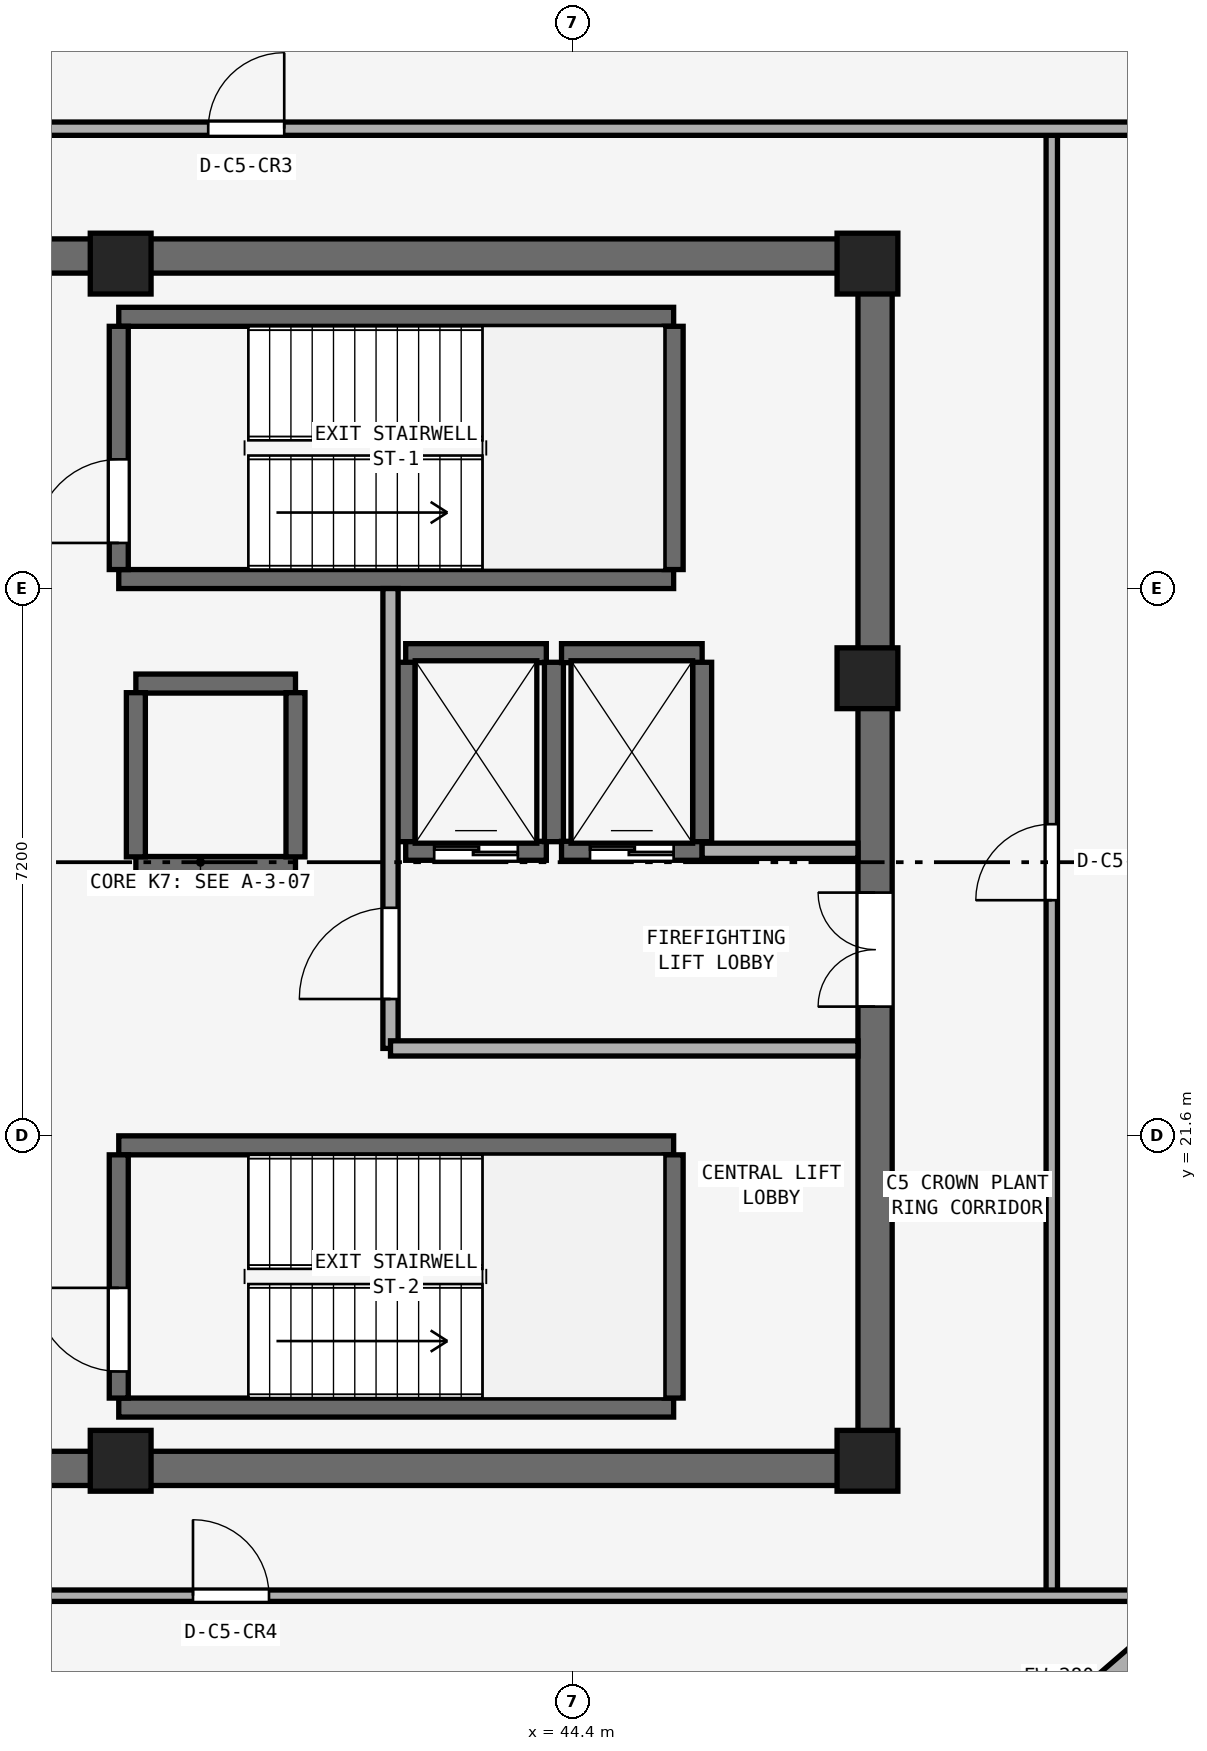
"""IFC4 building model, lengths in metres.
Left out: names, types, materials, properties, quantities, classifications, styles, units other than length and angle.
Written with IfcOpenShell. Run it as: python <this file> out.ifc"""

import sys

from ifc_helpers import new_model, si_unit, direction, frame, frame_2d, origin, origin_2d, place, context, subcontext, project, spatial, rectangle, extrude, element, fill, save


model = new_model("IFC4")
c1 = context("Model", 3, precision=1e-05, world=origin(), true_north=direction((0.0, 1.0)))
c2 = subcontext(c1, "Body", "Model", "MODEL_VIEW")
j1 = project(units=[si_unit("LENGTHUNIT", "METRE"), si_unit("PLANEANGLEUNIT", "RADIAN")], contexts=[c1])
p1 = place(None, origin())
s1 = spatial("IfcSite", under=j1, at=p1, CompositionType="ELEMENT")
p2 = place(p1, origin())
s2 = spatial("IfcBuilding", under=s1, at=p2, CompositionType="ELEMENT")
p3 = place(p2, frame((0.0, 0.0, 329.4)))
s3 = spatial("IfcBuildingStorey", under=s2, at=p3, CompositionType="ELEMENT", Elevation=329.4)
for number, where, z_axis, x_axis in (
    (1, (30.4, 17.225, 0.0), (0.0, 0.0, 1.0), (1.0, 0.0, 0.0)),
    (2, (30.4, 33.175, 0.0), (0.0, 0.0, 1.0), (1.0, 0.0, 0.0)),
):
    element("IfcWall", number, at=place(p3, frame(where, z_axis=z_axis, x_axis=x_axis)), inside=s3, PredefinedType="SHEAR", context=c2, shape_type="SweptSolid", body=[
        extrude(rectangle(XDim=18.2, YDim=0.45, at=frame_2d((9.1, 0.0))), origin(), (0.0, 0.0, 1.0), 3.72),
    ])
p4 = place(p3, frame((48.375, 17.45, 0.0), z_axis=(0.0, 0.0, 1.0), x_axis=(0.0, 1.0, 0.0)))
e3 = element("IfcWall", 3, at=p4, inside=s3, PredefinedType="SHEAR", context=c2, shape_type="SweptSolid", body=[
    extrude(rectangle(XDim=15.5, YDim=0.45, at=frame_2d((7.75, 0.0))), origin(), (0.0, 0.0, 1.0), 3.72),
])
p5 = place(p4, frame((5.85, 0.0, 0.0)))
e4 = element("IfcOpeningElement", 4, at=p5, cuts=e3, PredefinedType="OPENING", context=c2, shape_type="SweptSolid", body=[
    extrude(rectangle(XDim=1.5, YDim=2.15, at=frame_2d((0.75, 1.075))), frame((0.0, 0.235, 0.0), z_axis=(0.0, -1.0, 0.0), x_axis=(1.0, 0.0, 0.0)), (0.0, 0.0, 1.0), 0.47),
])
for number, where, z_axis, x_axis in (
    (5, (38.45, 17.325, 0.0), (0.0, 0.0, 1.0), (1.0, 0.0, 0.0)),
    (6, (48.275, 17.325, 0.0), (0.0, 0.0, 1.0), (1.0, 0.0, 0.0)),
    (7, (48.275, 27.62, 0.0), (0.0, 0.0, 1.0), (1.0, 0.0, 0.0)),
    (8, (48.275, 33.075, 0.0), (0.0, 0.0, 1.0), (1.0, 0.0, 0.0)),
    (9, (38.45, 33.075, 0.0), (0.0, 0.0, 1.0), (1.0, 0.0, 0.0)),
):
    element("IfcColumn", number, at=place(p3, frame(where, z_axis=z_axis, x_axis=x_axis)), inside=s3, PredefinedType="PILASTER", context=c2, shape_type="SweptSolid", body=[
        extrude(rectangle(XDim=0.8, YDim=0.8, at=origin_2d()), origin(), (0.0, 0.0, 1.0), 4.0),
    ])
for number, where, z_axis, x_axis in (
    (10, (38.425, 28.925, 0.0), (0.0, 0.0, 1.0), (1.0, 0.0, 0.0)),
    (11, (38.425, 32.375, 0.0), (0.0, 0.0, 1.0), (1.0, 0.0, 0.0)),
):
    element("IfcWall", number, at=place(p3, frame(where, z_axis=z_axis, x_axis=x_axis)), inside=s3, PredefinedType="SHEAR", context=c2, shape_type="SweptSolid", body=[
        extrude(rectangle(XDim=7.3, YDim=0.25, at=frame_2d((3.65, 0.0))), origin(), (0.0, 0.0, 1.0), 3.72),
    ])
p6 = place(p3, frame((38.425, 29.05, 0.0), z_axis=(0.0, 0.0, 1.0), x_axis=(0.0, 1.0, 0.0)))
e12 = element("IfcWall", 12, at=p6, inside=s3, PredefinedType="SHEAR", context=c2, shape_type="SweptSolid", body=[
    extrude(rectangle(XDim=3.2, YDim=0.25, at=frame_2d((1.6, 0.0))), origin(), (0.0, 0.0, 1.0), 3.72),
])
p7 = place(p6, frame((0.35, 0.0, 0.0)))
e13 = element("IfcOpeningElement", 13, at=p7, cuts=e12, PredefinedType="OPENING", context=c2, shape_type="SweptSolid", body=[
    extrude(rectangle(XDim=1.1, YDim=2.15, at=frame_2d((0.55, 1.075))), frame((0.0, 0.135, 0.0), z_axis=(0.0, -1.0, 0.0), x_axis=(1.0, 0.0, 0.0)), (0.0, 0.0, 1.0), 0.27),
])
p8 = place(p3, frame((45.725, 29.05, 0.0), z_axis=(0.0, 0.0, 1.0), x_axis=(0.0, 1.0, 0.0)))
e14 = element("IfcWall", 14, at=p8, inside=s3, PredefinedType="SHEAR", context=c2, shape_type="SweptSolid", body=[
    extrude(rectangle(XDim=3.2, YDim=0.25, at=frame_2d((1.6, 0.0))), origin(), (0.0, 0.0, 1.0), 3.72),
])
for number, where, z_axis, x_axis in (
    (15, (38.425, 18.025, 0.0), (0.0, 0.0, 1.0), (1.0, 0.0, 0.0)),
    (16, (38.425, 21.475, 0.0), (0.0, 0.0, 1.0), (1.0, 0.0, 0.0)),
):
    element("IfcWall", number, at=place(p3, frame(where, z_axis=z_axis, x_axis=x_axis)), inside=s3, PredefinedType="SHEAR", context=c2, shape_type="SweptSolid", body=[
        extrude(rectangle(XDim=7.3, YDim=0.25, at=frame_2d((3.65, 0.0))), origin(), (0.0, 0.0, 1.0), 3.72),
    ])
p9 = place(p3, frame((38.425, 18.15, 0.0), z_axis=(0.0, 0.0, 1.0), x_axis=(0.0, 1.0, 0.0)))
e17 = element("IfcWall", 17, at=p9, inside=s3, PredefinedType="SHEAR", context=c2, shape_type="SweptSolid", body=[
    extrude(rectangle(XDim=3.2, YDim=0.25, at=frame_2d((1.6, 0.0))), origin(), (0.0, 0.0, 1.0), 3.72),
])
p10 = place(p9, frame((0.35, 0.0, 0.0)))
e18 = element("IfcOpeningElement", 18, at=p10, cuts=e17, PredefinedType="OPENING", context=c2, shape_type="SweptSolid", body=[
    extrude(rectangle(XDim=1.1, YDim=2.15, at=frame_2d((0.55, 1.075))), frame((0.0, 0.135, 0.0), z_axis=(0.0, -1.0, 0.0), x_axis=(1.0, 0.0, 0.0)), (0.0, 0.0, 1.0), 0.27),
])
p11 = place(p3, frame((45.725, 18.15, 0.0), z_axis=(0.0, 0.0, 1.0), x_axis=(0.0, 1.0, 0.0)))
e19 = element("IfcWall", 19, at=p11, inside=s3, PredefinedType="SHEAR", context=c2, shape_type="SweptSolid", body=[
    extrude(rectangle(XDim=3.2, YDim=0.25, at=frame_2d((1.6, 0.0))), origin(), (0.0, 0.0, 1.0), 3.72),
])
p12 = place(p3, frame((42.2, 25.35, 0.0), z_axis=(0.0, 0.0, 1.0), x_axis=(1.0, 0.0, 0.0)))
e20 = element("IfcWall", 20, at=p12, inside=s3, PredefinedType="SHEAR", context=c2, shape_type="SweptSolid", body=[
    extrude(rectangle(XDim=1.85, YDim=0.25, at=frame_2d((0.925, 0.0))), origin(), (0.0, 0.0, 1.0), 3.72),
])
p13 = place(p12, frame((0.375, 0.0, 0.0)))
e21 = element("IfcOpeningElement", 21, at=p13, cuts=e20, PredefinedType="OPENING", context=c2, shape_type="SweptSolid", body=[
    extrude(rectangle(XDim=1.1, YDim=2.15, at=frame_2d((0.55, 1.075))), frame((0.0, 0.135, 0.0), z_axis=(0.0, -1.0, 0.0), x_axis=(1.0, 0.0, 0.0)), (0.0, 0.0, 1.0), 0.27),
])
p14 = place(p3, frame((42.2, 27.95, 0.0), z_axis=(0.0, 0.0, 1.0), x_axis=(1.0, 0.0, 0.0)))
e22 = element("IfcWall", 22, at=p14, inside=s3, PredefinedType="SHEAR", context=c2, shape_type="SweptSolid", body=[
    extrude(rectangle(XDim=1.85, YDim=0.25, at=frame_2d((0.925, 0.0))), origin(), (0.0, 0.0, 1.0), 3.72),
])
for number, where, z_axis, x_axis in (
    (23, (42.2, 25.47, 0.0), (0.0, 0.0, 1.0), (0.0, 1.0, 0.0)),
    (24, (44.15, 25.47, 0.0), (0.0, 0.0, 1.0), (0.0, 1.0, 0.0)),
):
    element("IfcWall", number, at=place(p3, frame(where, z_axis=z_axis, x_axis=x_axis)), inside=s3, PredefinedType="SHEAR", context=c2, shape_type="SweptSolid", body=[
        extrude(rectangle(XDim=2.36, YDim=0.25, at=frame_2d((1.18, 0.0))), origin(), (0.0, 0.0, 1.0), 3.72),
    ])
p15 = place(p3, frame((44.25, 25.35, 0.0), z_axis=(0.0, 0.0, 1.0), x_axis=(1.0, 0.0, 0.0)))
e25 = element("IfcWall", 25, at=p15, inside=s3, PredefinedType="SHEAR", context=c2, shape_type="SweptSolid", body=[
    extrude(rectangle(XDim=1.85, YDim=0.25, at=frame_2d((0.925, 0.0))), origin(), (0.0, 0.0, 1.0), 3.72),
])
p16 = place(p15, frame((0.375, 0.0, 0.0)))
e26 = element("IfcOpeningElement", 26, at=p16, cuts=e25, PredefinedType="OPENING", context=c2, shape_type="SweptSolid", body=[
    extrude(rectangle(XDim=1.1, YDim=2.15, at=frame_2d((0.55, 1.075))), frame((0.0, 0.135, 0.0), z_axis=(0.0, -1.0, 0.0), x_axis=(1.0, 0.0, 0.0)), (0.0, 0.0, 1.0), 0.27),
])
p17 = place(p3, frame((44.25, 27.95, 0.0), z_axis=(0.0, 0.0, 1.0), x_axis=(1.0, 0.0, 0.0)))
e27 = element("IfcWall", 27, at=p17, inside=s3, PredefinedType="SHEAR", context=c2, shape_type="SweptSolid", body=[
    extrude(rectangle(XDim=1.85, YDim=0.25, at=frame_2d((0.925, 0.0))), origin(), (0.0, 0.0, 1.0), 3.72),
])
p18 = place(p3, frame((46.1, 25.47, 0.0), z_axis=(0.0, 0.0, 1.0), x_axis=(0.0, 1.0, 0.0)))
e28 = element("IfcWall", 28, at=p18, inside=s3, PredefinedType="SHEAR", context=c2, shape_type="SweptSolid", body=[
    extrude(rectangle(XDim=2.36, YDim=0.25, at=frame_2d((1.18, 0.0))), origin(), (0.0, 0.0, 1.0), 3.72),
])
for number, where, z_axis, x_axis in (
    (29, (38.65, 25.15, 0.0), (0.0, 0.0, 1.0), (1.0, 0.0, 0.0)),
    (30, (38.65, 27.55, 0.0), (0.0, 0.0, 1.0), (1.0, 0.0, 0.0)),
):
    element("IfcWall", number, at=place(p3, frame(where, z_axis=z_axis, x_axis=x_axis)), inside=s3, PredefinedType="SHEAR", context=c2, shape_type="SweptSolid", body=[
        extrude(rectangle(XDim=2.1, YDim=0.25, at=frame_2d((1.05, 0.0))), origin(), (0.0, 0.0, 1.0), 3.72),
    ])
for number, where, z_axis, x_axis in (
    (31, (38.65, 25.27, 0.0), (0.0, 0.0, 1.0), (0.0, 1.0, 0.0)),
    (32, (40.75, 25.27, 0.0), (0.0, 0.0, 1.0), (0.0, 1.0, 0.0)),
):
    element("IfcWall", number, at=place(p3, frame(where, z_axis=z_axis, x_axis=x_axis)), inside=s3, PredefinedType="SHEAR", context=c2, shape_type="SweptSolid", body=[
        extrude(rectangle(XDim=2.16, YDim=0.25, at=frame_2d((1.08, 0.0))), origin(), (0.0, 0.0, 1.0), 3.72),
    ])
p19 = place(p3, frame((42.0, 22.75, 0.0), z_axis=(0.0, 0.0, 1.0), x_axis=(0.0, 1.0, 0.0)))
e33 = element("IfcWall", 33, at=p19, inside=s3, PredefinedType="SOLIDWALL", context=c2, shape_type="SweptSolid", body=[
    extrude(rectangle(XDim=6.05, YDim=0.2, at=frame_2d((3.025, 0.0))), origin(), (0.0, 0.0, 1.0), 3.72),
])
p20 = place(p19, frame((0.65, 0.0, 0.0)))
e34 = element("IfcOpeningElement", 34, at=p20, cuts=e33, PredefinedType="OPENING", context=c2, shape_type="SweptSolid", body=[
    extrude(rectangle(XDim=1.2, YDim=2.15, at=frame_2d((0.6, 1.075))), frame((0.0, 0.11, 0.0), z_axis=(0.0, -1.0, 0.0), x_axis=(1.0, 0.0, 0.0)), (0.0, 0.0, 1.0), 0.22),
])
p21 = place(p3, frame((42.0, 22.75, 0.0), z_axis=(0.0, 0.0, 1.0), x_axis=(1.0, 0.0, 0.0)))
e35 = element("IfcWall", 35, at=p21, inside=s3, PredefinedType="SOLIDWALL", context=c2, shape_type="SweptSolid", body=[
    extrude(rectangle(XDim=6.15, YDim=0.2, at=frame_2d((3.075, 0.0))), origin(), (0.0, 0.0, 1.0), 3.72),
])
p22 = place(p3, frame((46.1, 25.35, 0.0), z_axis=(0.0, 0.0, 1.0), x_axis=(1.0, 0.0, 0.0)))
e36 = element("IfcWall", 36, at=p22, inside=s3, PredefinedType="SOLIDWALL", context=c2, shape_type="SweptSolid", body=[
    extrude(rectangle(XDim=2.05, YDim=0.2, at=frame_2d((1.025, 0.0))), origin(), (0.0, 0.0, 1.0), 3.72),
])
p23 = place(p3, frame((50.7, 15.55, 0.0), z_axis=(0.0, 0.0, 1.0), x_axis=(0.0, 1.0, 0.0)))
e37 = element("IfcWall", 37, at=p23, inside=s3, PredefinedType="PARTITIONING", context=c2, shape_type="SweptSolid", body=[
    extrude(rectangle(XDim=19.3, YDim=0.15, at=frame_2d((9.65, 0.0))), origin(), (0.0, 0.0, 1.0), 3.72),
])
p24 = place(p23, frame((9.15, 0.0, 0.0)))
e38 = element("IfcOpeningElement", 38, at=p24, cuts=e37, PredefinedType="OPENING", context=c2, shape_type="SweptSolid", body=[
    extrude(rectangle(XDim=1.0, YDim=2.12, at=frame_2d((0.5, 1.06))), frame((0.0, 0.085, 0.0), z_axis=(0.0, -1.0, 0.0), x_axis=(1.0, 0.0, 0.0)), (0.0, 0.0, 1.0), 0.17),
])
p25 = place(p3, frame((28.818, 15.55, 0.0), z_axis=(0.0, 0.0, 1.0), x_axis=(1.0, 0.0, 0.0)))
e39 = element("IfcWall", 39, at=p25, inside=s3, PredefinedType="PARTITIONING", context=c2, shape_type="SweptSolid", body=[
    extrude(rectangle(XDim=23.98, YDim=0.15, at=frame_2d((11.99, 0.0))), origin(), (0.0, 0.0, 1.0), 3.72),
])
p26 = place(p25, frame((10.583, 0.0, 0.0)))
e40 = element("IfcOpeningElement", 40, at=p26, cuts=e39, PredefinedType="OPENING", context=c2, shape_type="SweptSolid", body=[
    extrude(rectangle(XDim=1.0, YDim=2.12, at=frame_2d((0.5, 1.06))), frame((0.0, 0.085, 0.0), z_axis=(0.0, -1.0, 0.0), x_axis=(1.0, 0.0, 0.0)), (0.0, 0.0, 1.0), 0.17),
])
p27 = place(p3, frame((29.236, 34.85, 0.0), z_axis=(0.0, 0.0, 1.0), x_axis=(1.0, 0.0, 0.0)))
e41 = element("IfcWall", 41, at=p27, inside=s3, PredefinedType="PARTITIONING", context=c2, shape_type="SweptSolid", body=[
    extrude(rectangle(XDim=24.422, YDim=0.175, at=frame_2d((12.211, 0.0))), origin(), (0.0, 0.0, 1.0), 3.72),
])
p28 = place(p27, frame((10.365, 0.0, 0.0)))
e42 = element("IfcOpeningElement", 42, at=p28, cuts=e41, PredefinedType="OPENING", context=c2, shape_type="SweptSolid", body=[
    extrude(rectangle(XDim=1.0, YDim=2.12, at=frame_2d((0.5, 1.06))), frame((0.0, 0.097, 0.0), z_axis=(0.0, -1.0, 0.0), x_axis=(1.0, 0.0, 0.0)), (0.0, 0.0, 1.0), 0.195),
])
p29 = place(p3, frame((46.921, 10.533, 0.0), z_axis=(0.0, 0.0, 1.0), x_axis=(0.756489047049, 0.654006362121, 0.0)))
e43 = element("IfcWall", 43, at=p29, inside=s3, PredefinedType="STANDARD", context=c2, shape_type="SweptSolid", body=[
    extrude(rectangle(XDim=10.244, YDim=0.28, at=frame_2d((5.122, 0.0))), origin(), (0.0, 0.0, 1.0), 3.72),
])
p30 = place(p29, frame((1.24, 0.0, 0.9)))
e44 = element("IfcOpeningElement", 44, at=p30, cuts=e43, PredefinedType="OPENING", context=c2, shape_type="SweptSolid", body=[
    extrude(rectangle(XDim=1.6, YDim=1.45, at=frame_2d((0.8, 0.725))), frame((0.0, 0.15, 0.0), z_axis=(0.0, -1.0, 0.0), x_axis=(1.0, 0.0, 0.0)), (0.0, 0.0, 1.0), 0.3),
])
p31 = place(p29, frame((4.322, 0.0, 0.9)))
e45 = element("IfcOpeningElement", 45, at=p31, cuts=e43, PredefinedType="OPENING", context=c2, shape_type="SweptSolid", body=[
    extrude(rectangle(XDim=1.6, YDim=1.45, at=frame_2d((0.8, 0.725))), frame((0.0, 0.15, 0.0), z_axis=(0.0, -1.0, 0.0), x_axis=(1.0, 0.0, 0.0)), (0.0, 0.0, 1.0), 0.3),
])
p32 = place(p29, frame((8.183, 0.0, 0.9)))
e46 = element("IfcOpeningElement", 46, at=p32, cuts=e43, PredefinedType="OPENING", context=c2, shape_type="SweptSolid", body=[
    extrude(rectangle(XDim=1.6, YDim=1.45, at=frame_2d((0.8, 0.725))), frame((0.0, 0.15, 0.0), z_axis=(0.0, -1.0, 0.0), x_axis=(1.0, 0.0, 0.0)), (0.0, 0.0, 1.0), 0.3),
])
p33 = place(p3, frame((54.543, 34.102, 0.0), z_axis=(0.0, 0.0, 1.0), x_axis=(-0.792926835332, 0.609316858302, 0.0)))
e47 = element("IfcWall", 47, at=p33, inside=s3, PredefinedType="STANDARD", context=c2, shape_type="SweptSolid", body=[
    extrude(rectangle(XDim=9.647, YDim=0.28, at=frame_2d((4.823, 0.0))), origin(), (0.0, 0.0, 1.0), 3.72),
])
p34 = place(p33, frame((4.023, 0.0, 0.9)))
e48 = element("IfcOpeningElement", 48, at=p34, cuts=e47, PredefinedType="OPENING", context=c2, shape_type="SweptSolid", body=[
    extrude(rectangle(XDim=1.6, YDim=1.45, at=frame_2d((0.8, 0.725))), frame((0.0, 0.15, 0.0), z_axis=(0.0, -1.0, 0.0), x_axis=(1.0, 0.0, 0.0)), (0.0, 0.0, 1.0), 0.3),
])
p35 = place(p33, frame((6.906, 0.0, 0.9)))
e49 = element("IfcOpeningElement", 49, at=p35, cuts=e47, PredefinedType="OPENING", context=c2, shape_type="SweptSolid", body=[
    extrude(rectangle(XDim=1.6, YDim=1.45, at=frame_2d((0.8, 0.725))), frame((0.0, 0.15, 0.0), z_axis=(0.0, -1.0, 0.0), x_axis=(1.0, 0.0, 0.0)), (0.0, 0.0, 1.0), 0.3),
])
p36 = place(p7, origin())
e50 = element("IfcDoor", 50, at=p36, inside=s3, OperationType="SINGLE_SWING_LEFT", PredefinedType="DOOR", context=c2, shape_type="SweptSolid", body=[
    extrude(rectangle(XDim=1.1, YDim=2.15, at=frame_2d((0.55, 1.075))), frame((0.0, 0.025, 0.0), z_axis=(0.0, -1.0, 0.0), x_axis=(1.0, 0.0, 0.0)), (0.0, 0.0, 1.0), 0.05),
])
fill(e13, e50)
p37 = place(p10, origin())
e51 = element("IfcDoor", 51, at=p37, inside=s3, OperationType="SINGLE_SWING_RIGHT", PredefinedType="DOOR", context=c2, shape_type="SweptSolid", body=[
    extrude(rectangle(XDim=1.1, YDim=2.15, at=frame_2d((0.55, 1.075))), frame((0.0, 0.025, 0.0), z_axis=(0.0, -1.0, 0.0), x_axis=(1.0, 0.0, 0.0)), (0.0, 0.0, 1.0), 0.05),
])
fill(e18, e51)
p38 = place(p13, origin())
e52 = element("IfcDoor", 52, at=p38, inside=s3, OperationType="DOUBLE_DOOR_SLIDING", PredefinedType="DOOR", context=c2, shape_type="SweptSolid", body=[
    extrude(rectangle(XDim=1.1, YDim=2.15, at=frame_2d((0.55, 1.075))), frame((0.0, 0.025, 0.0), z_axis=(0.0, -1.0, 0.0), x_axis=(1.0, 0.0, 0.0)), (0.0, 0.0, 1.0), 0.05),
])
fill(e21, e52)
p39 = place(p16, origin())
e53 = element("IfcDoor", 53, at=p39, inside=s3, OperationType="DOUBLE_DOOR_SLIDING", PredefinedType="DOOR", context=c2, shape_type="SweptSolid", body=[
    extrude(rectangle(XDim=1.1, YDim=2.15, at=frame_2d((0.55, 1.075))), frame((0.0, 0.025, 0.0), z_axis=(0.0, -1.0, 0.0), x_axis=(1.0, 0.0, 0.0)), (0.0, 0.0, 1.0), 0.05),
])
fill(e26, e53)
p40 = place(p20, origin())
e54 = element("IfcDoor", 54, at=p40, inside=s3, OperationType="SINGLE_SWING_LEFT", PredefinedType="DOOR", context=c2, shape_type="SweptSolid", body=[
    extrude(rectangle(XDim=1.2, YDim=2.15, at=frame_2d((0.6, 1.075))), frame((0.0, 0.025, 0.0), z_axis=(0.0, -1.0, 0.0), x_axis=(1.0, 0.0, 0.0)), (0.0, 0.0, 1.0), 0.05),
])
fill(e34, e54)
p41 = place(p5, origin())
e55 = element("IfcDoor", 55, at=p41, inside=s3, OperationType="DOUBLE_DOOR_SINGLE_SWING", PredefinedType="DOOR", context=c2, shape_type="SweptSolid", body=[
    extrude(rectangle(XDim=1.5, YDim=2.15, at=frame_2d((0.75, 1.075))), frame((0.0, 0.025, 0.0), z_axis=(0.0, -1.0, 0.0), x_axis=(1.0, 0.0, 0.0)), (0.0, 0.0, 1.0), 0.05),
])
fill(e4, e55)
p42 = place(p24, origin())
e56 = element("IfcDoor", 56, at=p42, inside=s3, OperationType="SINGLE_SWING_LEFT", PredefinedType="DOOR", context=c2, shape_type="SweptSolid", body=[
    extrude(rectangle(XDim=1.0, YDim=2.12, at=frame_2d((0.5, 1.06))), frame((0.0, 0.025, 0.0), z_axis=(0.0, -1.0, 0.0), x_axis=(1.0, 0.0, 0.0)), (0.0, 0.0, 1.0), 0.05),
])
fill(e38, e56)
p43 = place(p28, origin())
e57 = element("IfcDoor", 57, at=p43, inside=s3, OperationType="SINGLE_SWING_RIGHT", PredefinedType="DOOR", context=c2, shape_type="SweptSolid", body=[
    extrude(rectangle(XDim=1.0, YDim=2.12, at=frame_2d((0.5, 1.06))), frame((0.0, 0.025, 0.0), z_axis=(0.0, -1.0, 0.0), x_axis=(1.0, 0.0, 0.0)), (0.0, 0.0, 1.0), 0.05),
])
fill(e42, e57)
p44 = place(p26, origin())
e58 = element("IfcDoor", 58, at=p44, inside=s3, OperationType="SINGLE_SWING_LEFT", PredefinedType="DOOR", context=c2, shape_type="SweptSolid", body=[
    extrude(rectangle(XDim=1.0, YDim=2.12, at=frame_2d((0.5, 1.06))), frame((0.0, 0.025, 0.0), z_axis=(0.0, -1.0, 0.0), x_axis=(1.0, 0.0, 0.0)), (0.0, 0.0, 1.0), 0.05),
])
fill(e40, e58)
save(model, sys.argv[1])
